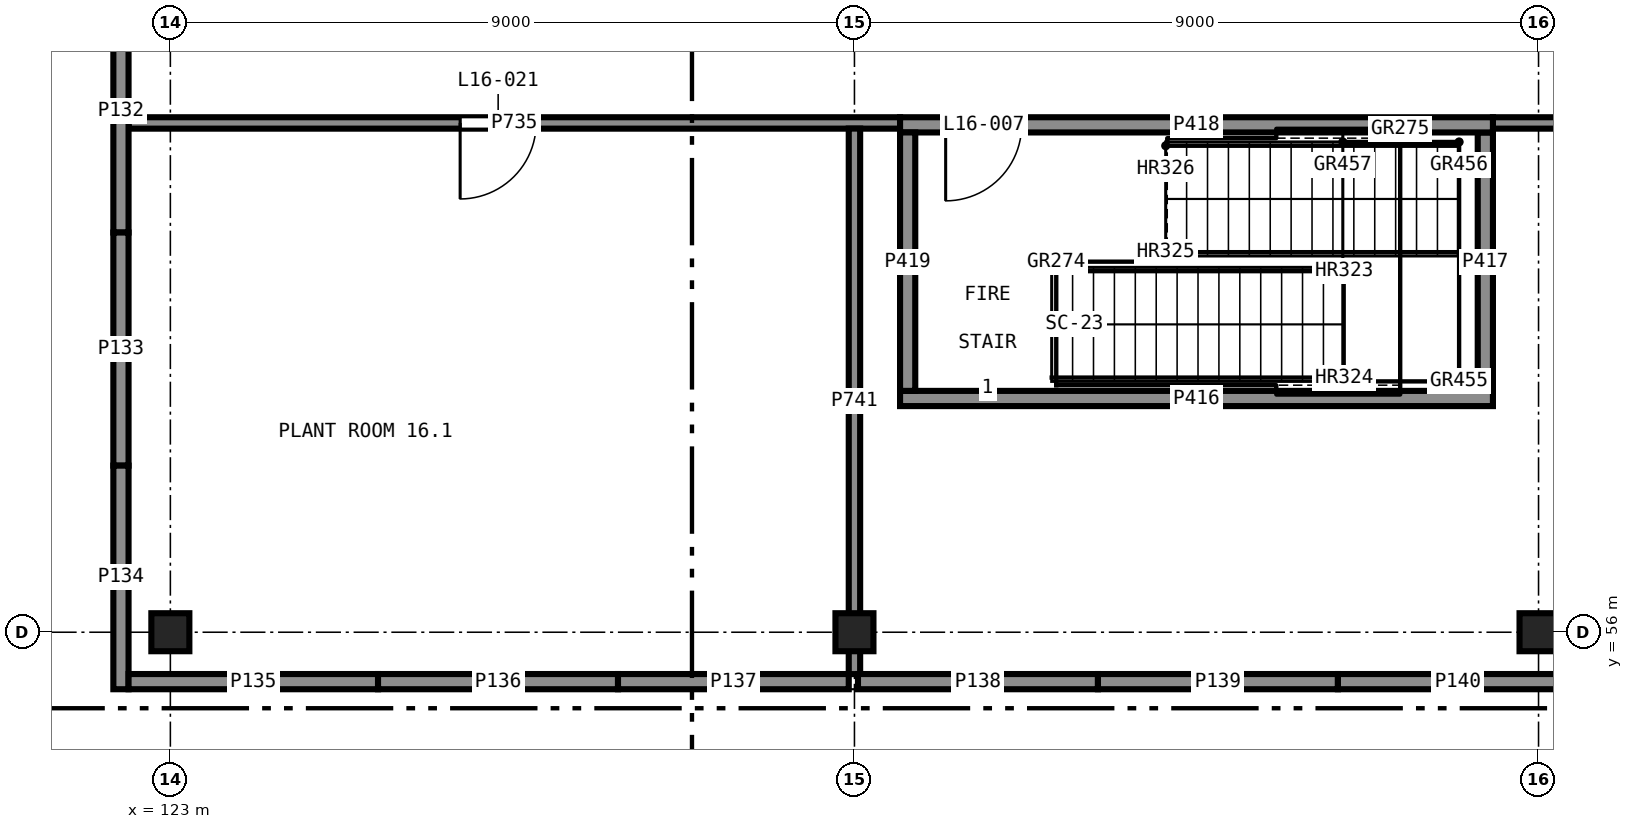
"""IFC4 building model, lengths in metres.
Left out: names, types, materials, properties, quantities, classifications, styles, units other than length and angle.
Written with IfcOpenShell. Run it as: python <this file> out.ifc"""

import sys

from ifc_helpers import new_model, si_unit, direction, frame, frame_2d, origin, origin_2d, place, context, subcontext, project, spatial, polyline, rectangle, outline, extrude, element, fill, save


model = new_model("IFC4")
c1 = context("Model", 3, precision=1e-05, world=origin(), true_north=direction((0.0, 1.0)))
c2 = subcontext(c1, "Body", "Model", "MODEL_VIEW")
j1 = project(units=[si_unit("LENGTHUNIT", "METRE"), si_unit("PLANEANGLEUNIT", "RADIAN")], contexts=[c1])
p1 = place(None, origin())
s1 = spatial("IfcSite", under=j1, at=p1, CompositionType="ELEMENT")
p2 = place(p1, origin())
s2 = spatial("IfcBuilding", under=s1, at=p2, CompositionType="ELEMENT")
p3 = place(p2, frame((0.0, 0.0, 65.5)))
s3 = spatial("IfcBuildingStorey", under=s2, at=p3, CompositionType="ELEMENT", Elevation=65.5)
for number, where, z_axis, x_axis in (
    (1, (123.0, 56.0, 0.0), (0.0, 0.0, 1.0), (1.0, 0.0, 0.0)),
    (2, (132.0, 56.0, 0.0), (0.0, 0.0, 1.0), (1.0, 0.0, 0.0)),
    (3, (141.0, 56.0, 0.0), (0.0, 0.0, 1.0), (1.0, 0.0, 0.0)),
):
    element("IfcColumn", number, at=place(p3, frame(where, z_axis=z_axis, x_axis=x_axis)), inside=s3, PredefinedType="COLUMN", context=c2, shape_type="SweptSolid", body=[
        extrude(rectangle(XDim=0.5, YDim=0.5, at=origin_2d()), origin(), (0.0, 0.0, 1.0), 4.7),
    ])
p4 = place(p3, frame((122.35, 64.45, 0.0), z_axis=(0.0, 0.0, 1.0), x_axis=(0.0, -1.0, 0.0)))
e4 = element("IfcWall", 4, at=p4, inside=s3, PredefinedType="SOLIDWALL", context=c2, shape_type="SweptSolid", body=[
    extrude(rectangle(XDim=3.192, YDim=0.2, at=frame_2d((1.596, 0.0))), origin(), (0.0, 0.0, 1.0), 4.7),
])
p5 = place(p3, frame((122.35, 61.258, 0.0), z_axis=(0.0, 0.0, 1.0), x_axis=(0.0, -1.0, 0.0)))
e5 = element("IfcWall", 5, at=p5, inside=s3, PredefinedType="SOLIDWALL", context=c2, shape_type="SweptSolid", body=[
    extrude(rectangle(XDim=3.067, YDim=0.2, at=frame_2d((1.533, 0.0))), origin(), (0.0, 0.0, 1.0), 4.7),
])
p6 = place(p3, frame((122.35, 58.192, 0.0), z_axis=(0.0, 0.0, 1.0), x_axis=(0.0, -1.0, 0.0)))
e6 = element("IfcWall", 6, at=p6, inside=s3, PredefinedType="SOLIDWALL", context=c2, shape_type="SweptSolid", body=[
    extrude(rectangle(XDim=2.942, YDim=0.2, at=frame_2d((1.471, 0.0))), origin(), (0.0, 0.0, 1.0), 4.7),
])
p7 = place(p3, frame((122.45, 55.35, 0.0), z_axis=(0.0, 0.0, 1.0), x_axis=(1.0, 0.0, 0.0)))
e7 = element("IfcWall", 7, at=p7, inside=s3, PredefinedType="SOLIDWALL", context=c2, shape_type="SweptSolid", body=[
    extrude(rectangle(XDim=3.282, YDim=0.2, at=frame_2d((1.641, 0.0))), origin(), (0.0, 0.0, 1.0), 4.7),
])
p8 = place(p3, frame((125.732, 55.35, 0.0), z_axis=(0.0, 0.0, 1.0), x_axis=(1.0, 0.0, 0.0)))
e8 = element("IfcWall", 8, at=p8, inside=s3, PredefinedType="SOLIDWALL", context=c2, shape_type="SweptSolid", body=[
    extrude(rectangle(XDim=3.157, YDim=0.2, at=frame_2d((1.579, 0.0))), origin(), (0.0, 0.0, 1.0), 4.7),
])
p9 = place(p3, frame((128.889, 55.35, 0.0), z_axis=(0.0, 0.0, 1.0), x_axis=(1.0, 0.0, 0.0)))
e9 = element("IfcWall", 9, at=p9, inside=s3, PredefinedType="SOLIDWALL", context=c2, shape_type="SweptSolid", body=[
    extrude(rectangle(XDim=3.036, YDim=0.2, at=frame_2d((1.518, 0.0))), origin(), (0.0, 0.0, 1.0), 4.7),
])
p10 = place(p3, frame((132.046, 55.35, 0.0), z_axis=(0.0, 0.0, 1.0), x_axis=(1.0, 0.0, 0.0)))
e10 = element("IfcWall", 10, at=p10, inside=s3, PredefinedType="SOLIDWALL", context=c2, shape_type="SweptSolid", body=[
    extrude(rectangle(XDim=3.157, YDim=0.2, at=frame_2d((1.579, 0.0))), origin(), (0.0, 0.0, 1.0), 4.7),
])
p11 = place(p3, frame((135.204, 55.35, 0.0), z_axis=(0.0, 0.0, 1.0), x_axis=(1.0, 0.0, 0.0)))
e11 = element("IfcWall", 11, at=p11, inside=s3, PredefinedType="SOLIDWALL", context=c2, shape_type="SweptSolid", body=[
    extrude(rectangle(XDim=3.157, YDim=0.2, at=frame_2d((1.579, 0.0))), origin(), (0.0, 0.0, 1.0), 4.7),
])
p12 = place(p3, frame((138.361, 55.35, 0.0), z_axis=(0.0, 0.0, 1.0), x_axis=(1.0, 0.0, 0.0)))
e12 = element("IfcWall", 12, at=p12, inside=s3, PredefinedType="SOLIDWALL", context=c2, shape_type="SweptSolid", body=[
    extrude(rectangle(XDim=3.157, YDim=0.2, at=frame_2d((1.579, 0.0))), origin(), (0.0, 0.0, 1.0), 4.7),
])
p13 = place(p3, frame((132.6, 59.075, 0.0), z_axis=(0.0, 0.0, 1.0), x_axis=(1.0, 0.0, 0.0)))
e13 = element("IfcWall", 13, at=p13, inside=s3, PredefinedType="SHEAR", context=c2, shape_type="SweptSolid", body=[
    extrude(rectangle(XDim=7.8, YDim=0.2, at=frame_2d((3.9, 0.0))), origin(), (0.0, 0.0, 1.0), 4.7),
])
p14 = place(p3, frame((140.3, 59.175, 0.0), z_axis=(0.0, 0.0, 1.0), x_axis=(0.0, 1.0, 0.0)))
e14 = element("IfcWall", 14, at=p14, inside=s3, PredefinedType="SHEAR", context=c2, shape_type="SweptSolid", body=[
    extrude(rectangle(XDim=3.4, YDim=0.2, at=frame_2d((1.7, 0.0))), origin(), (0.0, 0.0, 1.0), 4.7),
])
p15 = place(p3, frame((140.4, 62.675, 0.0), z_axis=(0.0, 0.0, 1.0), x_axis=(-1.0, 0.0, 0.0)))
e15 = element("IfcWall", 15, at=p15, inside=s3, PredefinedType="SHEAR", context=c2, shape_type="SweptSolid", body=[
    extrude(rectangle(XDim=7.8, YDim=0.2, at=frame_2d((3.9, 0.0))), origin(), (0.0, 0.0, 1.0), 4.7),
])
p16 = place(p15, frame((6.2, 0.0, 0.0)))
e16 = element("IfcOpeningElement", 16, at=p16, cuts=e15, PredefinedType="OPENING", context=c2, shape_type="SweptSolid", body=[
    extrude(rectangle(XDim=1.0, YDim=2.1, at=frame_2d((0.5, 1.05))), frame((0.0, 0.11, 0.0), z_axis=(0.0, -1.0, 0.0), x_axis=(1.0, 0.0, 0.0)), (0.0, 0.0, 1.0), 0.22),
])
p17 = place(p3, frame((132.7, 62.575, 0.0), z_axis=(0.0, 0.0, 1.0), x_axis=(0.0, -1.0, 0.0)))
e17 = element("IfcWall", 17, at=p17, inside=s3, PredefinedType="SHEAR", context=c2, shape_type="SweptSolid", body=[
    extrude(rectangle(XDim=3.4, YDim=0.2, at=frame_2d((1.7, 0.0))), origin(), (0.0, 0.0, 1.0), 4.7),
])
p18 = place(p3, frame((132.6, 59.075, 5.0), z_axis=(0.0, 0.0, 1.0), x_axis=(1.0, 0.0, 0.0)))
e18 = element("IfcWall", 18, at=p18, inside=s3, PredefinedType="SHEAR", context=c2, shape_type="SweptSolid", body=[
    extrude(outline(polyline([(0.0, 0.0), (7.8, 0.0), (7.8, 2.627), (0.0, 2.627), (0.0, 0.0)])), frame((0.0, 0.1, 0.0), z_axis=(0.0, -1.0, 0.0), x_axis=(1.0, 0.0, 0.0)), (0.0, 0.0, 1.0), 0.2),
])
p19 = place(p3, frame((140.3, 59.175, 5.0), z_axis=(0.0, 0.0, 1.0), x_axis=(0.0, 1.0, 0.0)))
e19 = element("IfcWall", 19, at=p19, inside=s3, PredefinedType="SHEAR", context=c2, shape_type="SweptSolid", body=[
    extrude(outline(polyline([(0.0, 0.0), (3.4, 0.0), (3.4, 3.565), (0.0, 2.654), (0.0, 0.0)])), frame((0.0, 0.1, 0.0), z_axis=(0.0, -1.0, 0.0), x_axis=(1.0, 0.0, 0.0)), (0.0, 0.0, 1.0), 0.2),
])
p20 = place(p3, frame((140.4, 62.675, 5.0), z_axis=(0.0, 0.0, 1.0), x_axis=(-1.0, 0.0, 0.0)))
e20 = element("IfcWall", 20, at=p20, inside=s3, PredefinedType="SHEAR", context=c2, shape_type="SweptSolid", body=[
    extrude(outline(polyline([(0.0, 0.0), (7.8, 0.0), (7.8, 3.591), (0.0, 3.591), (0.0, 0.0)])), frame((0.0, 0.1, 0.0), z_axis=(0.0, -1.0, 0.0), x_axis=(1.0, 0.0, 0.0)), (0.0, 0.0, 1.0), 0.2),
])
p21 = place(p3, frame((132.7, 62.575, 5.0), z_axis=(0.0, 0.0, 1.0), x_axis=(0.0, -1.0, 0.0)))
e21 = element("IfcWall", 21, at=p21, inside=s3, PredefinedType="SHEAR", context=c2, shape_type="SweptSolid", body=[
    extrude(outline(polyline([(0.0, 0.0), (3.4, 0.0), (3.4, 2.654), (0.0, 3.565), (0.0, 0.0)])), frame((0.0, 0.1, 0.0), z_axis=(0.0, -1.0, 0.0), x_axis=(1.0, 0.0, 0.0)), (0.0, 0.0, 1.0), 0.2),
])
p22 = place(p21, frame((1.2, 0.0, 0.0)))
e22 = element("IfcOpeningElement", 22, at=p22, cuts=e21, PredefinedType="OPENING", context=c2, shape_type="SweptSolid", body=[
    extrude(rectangle(XDim=1.0, YDim=2.1, at=frame_2d((0.5, 1.05))), frame((0.0, 0.11, 0.0), z_axis=(0.0, -1.0, 0.0), x_axis=(1.0, 0.0, 0.0)), (0.0, 0.0, 1.0), 0.22),
])
p23 = place(p3, frame((132.6, 62.7, 0.0), z_axis=(0.0, 0.0, 1.0), x_axis=(-1.0, 0.0, 0.0)))
e23 = element("IfcWall", 23, at=p23, inside=s3, PredefinedType="PARTITIONING", context=c2, shape_type="SweptSolid", body=[
    extrude(rectangle(XDim=10.15, YDim=0.15, at=frame_2d((5.075, 0.0))), origin(), (0.0, 0.0, 1.0), 4.7),
])
p24 = place(p23, frame((4.788, 0.0, 0.0)))
e24 = element("IfcOpeningElement", 24, at=p24, cuts=e23, PredefinedType="OPENING", context=c2, shape_type="SweptSolid", body=[
    extrude(rectangle(XDim=1.0, YDim=2.1, at=frame_2d((0.5, 1.05))), frame((0.0, 0.085, 0.0), z_axis=(0.0, -1.0, 0.0), x_axis=(1.0, 0.0, 0.0)), (0.0, 0.0, 1.0), 0.17),
])
p25 = place(p3, frame((143.025, 62.7, 0.0), z_axis=(0.0, 0.0, 1.0), x_axis=(-1.0, 0.0, 0.0)))
e25 = element("IfcWall", 25, at=p25, inside=s3, PredefinedType="PARTITIONING", context=c2, shape_type="SweptSolid", body=[
    extrude(rectangle(XDim=2.625, YDim=0.15, at=frame_2d((1.312, 0.0))), origin(), (0.0, 0.0, 1.0), 4.7),
])
p26 = place(p3, frame((132.0, 55.449, 0.0), z_axis=(0.0, 0.0, 1.0), x_axis=(0.0, 1.0, 0.0)))
e26 = element("IfcWall", 26, at=p26, inside=s3, PredefinedType="PARTITIONING", context=c2, shape_type="SweptSolid", body=[
    extrude(rectangle(XDim=7.177, YDim=0.15, at=frame_2d((3.588, 0.0))), origin(), (0.0, 0.0, 1.0), 3.8),
])
p27 = place(p16, origin())
e27 = element("IfcDoor", 27, at=p27, inside=s3, OperationType="SINGLE_SWING_LEFT", PredefinedType="DOOR", context=c2, shape_type="SweptSolid", body=[
    extrude(rectangle(XDim=1.0, YDim=2.1, at=frame_2d((0.5, 1.05))), frame((0.0, 0.025, 0.0), z_axis=(0.0, -1.0, 0.0), x_axis=(1.0, 0.0, 0.0)), (0.0, 0.0, 1.0), 0.05),
])
fill(e16, e27)
p28 = place(p22, frame((1.0, 0.0, 0.0), z_axis=(0.0, 0.0, 1.0), x_axis=(-1.0, 0.0, 0.0)))
e28 = element("IfcDoor", 28, at=p28, inside=s3, OperationType="SINGLE_SWING_LEFT", PredefinedType="DOOR", context=c2, shape_type="SweptSolid", body=[
    extrude(rectangle(XDim=1.0, YDim=2.1, at=frame_2d((0.5, 1.05))), frame((0.0, 0.025, 0.0), z_axis=(0.0, -1.0, 0.0), x_axis=(1.0, 0.0, 0.0)), (0.0, 0.0, 1.0), 0.05),
])
fill(e22, e28)
p29 = place(p24, origin())
e29 = element("IfcDoor", 29, at=p29, inside=s3, OperationType="SINGLE_SWING_LEFT", PredefinedType="DOOR", context=c2, shape_type="SweptSolid", body=[
    extrude(rectangle(XDim=1.0, YDim=2.1, at=frame_2d((0.5, 1.05))), frame((0.0, 0.025, 0.0), z_axis=(0.0, -1.0, 0.0), x_axis=(1.0, 0.0, 0.0)), (0.0, 0.0, 1.0), 0.05),
])
fill(e24, e29)
save(model, sys.argv[1])
